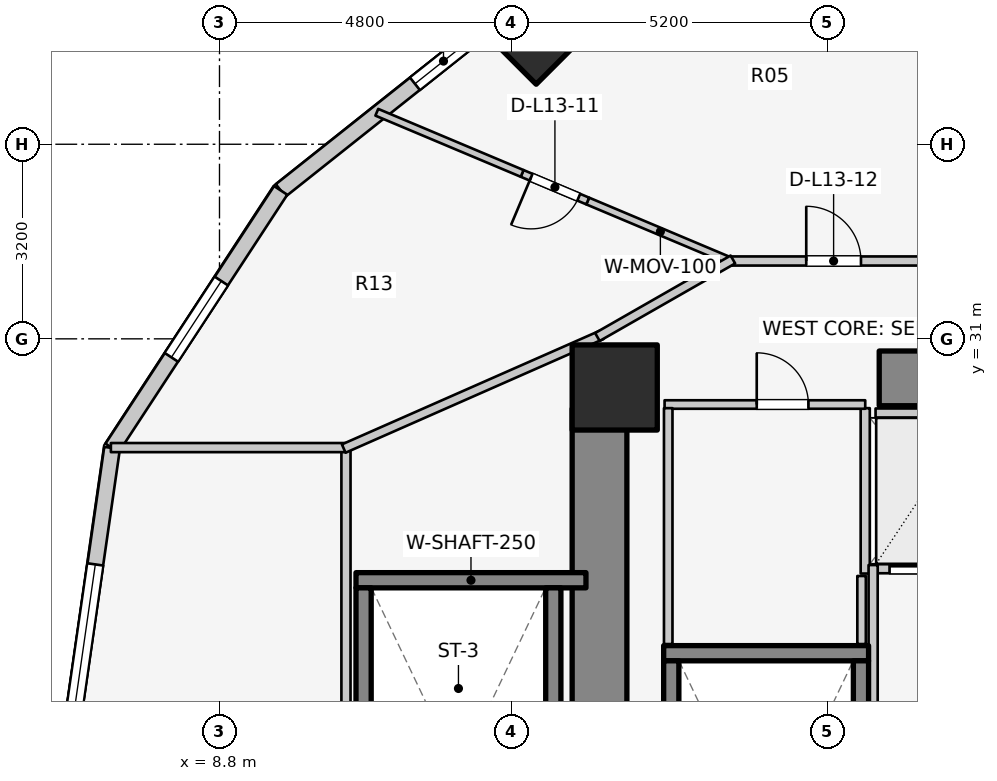
"""IFC4 building model, lengths in metres.
Left out: names, types, materials, properties, quantities, classifications, styles, units other than length and angle.
Written with IfcOpenShell. Run it as: python <this file> out.ifc"""

import sys

from ifc_helpers import new_model, si_unit, direction, frame, frame_2d, origin, origin_2d, place, context, subcontext, project, spatial, rectangle, extrude, element, fill, save


model = new_model("IFC4")
c1 = context("Model", 3, precision=1e-05, world=origin(), true_north=direction((0.0, 1.0)))
c2 = subcontext(c1, "Body", "Model", "MODEL_VIEW")
j1 = project(units=[si_unit("LENGTHUNIT", "METRE"), si_unit("PLANEANGLEUNIT", "RADIAN")], contexts=[c1])
p1 = place(None, origin())
s1 = spatial("IfcSite", under=j1, at=p1, CompositionType="ELEMENT")
p2 = place(p1, origin())
s2 = spatial("IfcBuilding", under=s1, at=p2, CompositionType="ELEMENT")
p3 = place(p2, frame((0.0, 0.0, 46.2)))
s3 = spatial("IfcBuildingStorey", under=s2, at=p3, CompositionType="ELEMENT", Elevation=46.2)
p4 = place(p3, frame((15.05, 17.05, 0.0), z_axis=(0.0, 0.0, 1.0), x_axis=(0.0, 1.0, 0.0)))
e1 = element("IfcWall", 1, at=p4, inside=s3, PredefinedType="SHEAR", context=c2, shape_type="SweptSolid", body=[
    extrude(rectangle(XDim=12.8, YDim=0.9, at=frame_2d((6.4, 0.0))), origin(), (0.0, 0.0, 1.0), 3.1),
])
p5 = place(p3, frame((19.65, 30.35, 0.0), z_axis=(0.0, 0.0, 1.0), x_axis=(1.0, 0.0, 0.0)))
e2 = element("IfcWall", 2, at=p5, inside=s3, PredefinedType="SHEAR", context=c2, shape_type="SweptSolid", body=[
    extrude(rectangle(XDim=4.5, YDim=0.9, at=frame_2d((2.25, 0.0))), origin(), (0.0, 0.0, 1.0), 3.1),
])
p6 = place(p3, frame((16.105, 25.83, 0.0), z_axis=(0.0, 0.0, 1.0), x_axis=(1.0, 0.0, 0.0)))
e3 = element("IfcWall", 3, at=p6, inside=s3, PredefinedType="SOLIDWALL", context=c2, shape_type="SweptSolid", body=[
    extrude(rectangle(XDim=3.37, YDim=0.25, at=frame_2d((1.685, 0.0))), origin(), (0.0, 0.0, 1.0), 3.1),
])
for number, where, z_axis, x_axis in (
    (4, (16.23, 17.895, 0.0), (0.0, 0.0, 1.0), (0.0, 1.0, 0.0)),
    (5, (19.35, 17.895, 0.0), (0.0, 0.0, 1.0), (0.0, 1.0, 0.0)),
):
    element("IfcWall", number, at=place(p3, frame(where, z_axis=z_axis, x_axis=x_axis)), inside=s3, PredefinedType="SOLIDWALL", context=c2, shape_type="SweptSolid", body=[
        extrude(rectangle(XDim=7.81, YDim=0.25, at=frame_2d((3.905, 0.0))), origin(), (0.0, 0.0, 1.0), 3.1),
    ])
p7 = place(p3, frame((11.045, 27.03, 0.0), z_axis=(0.0, 0.0, 1.0), x_axis=(1.0, 0.0, 0.0)))
e6 = element("IfcWall", 6, at=p7, inside=s3, PredefinedType="SOLIDWALL", context=c2, shape_type="SweptSolid", body=[
    extrude(rectangle(XDim=3.782, YDim=0.25, at=frame_2d((1.891, 0.0))), origin(), (0.0, 0.0, 1.0), 3.1),
])
for number, where, z_axis, x_axis in (
    (7, (11.17, 19.095, 0.0), (0.0, 0.0, 1.0), (0.0, 1.0, 0.0)),
    (8, (14.29, 19.095, 0.0), (0.0, 0.0, 1.0), (0.0, 1.0, 0.0)),
):
    element("IfcWall", number, at=place(p3, frame(where, z_axis=z_axis, x_axis=x_axis)), inside=s3, PredefinedType="SOLIDWALL", context=c2, shape_type="SweptSolid", body=[
        extrude(rectangle(XDim=7.81, YDim=0.25, at=frame_2d((3.905, 0.0))), origin(), (0.0, 0.0, 1.0), 3.1),
    ])
p8 = place(p3, frame((15.3, 30.2, 0.0), z_axis=(0.0, 0.0, 1.0), x_axis=(1.0, 0.0, 0.0)))
e9 = element("IfcColumn", 9, at=p8, inside=s3, PredefinedType="COLUMN", context=c2, shape_type="SweptSolid", body=[
    extrude(rectangle(XDim=1.4, YDim=1.4, at=origin_2d()), origin(), (0.0, 0.0, 1.0), 3.1),
])
p9 = place(p3, frame((14.008, 36.035, 0.0), z_axis=(0.0, 0.0, 1.0), x_axis=(-0.707106781187, 0.707106781187, 0.0)))
e10 = element("IfcColumn", 10, at=p9, inside=s3, PredefinedType="COLUMN", context=c2, shape_type="SweptSolid", body=[
    extrude(rectangle(XDim=1.2, YDim=1.2, at=origin_2d()), origin(), (0.0, 0.0, 1.0), 3.1),
])
p10 = place(p3, frame((13.595, 36.45, 0.0), z_axis=(0.0, 0.0, 1.0), x_axis=(-0.783123133379, -0.621866672179, 0.0)))
e11 = element("IfcWall", 11, at=p10, inside=s3, PredefinedType="STANDARD", context=c2, shape_type="SweptSolid", body=[
    extrude(rectangle(XDim=4.839, YDim=0.26, at=frame_2d((2.419, 0.0))), origin(), (0.0, 0.0, 1.0), 2.85),
])
p11 = place(p10, frame((0.819, 0.0, 0.75)))
e12 = element("IfcOpeningElement", 12, at=p11, cuts=e11, PredefinedType="OPENING", context=c2, shape_type="SweptSolid", body=[
    extrude(rectangle(XDim=1.2, YDim=1.5, at=frame_2d((0.6, 0.75))), frame((0.0, 0.14, 0.0), z_axis=(0.0, -1.0, 0.0), x_axis=(1.0, 0.0, 0.0)), (0.0, 0.0, 1.0), 0.28),
])
p12 = place(p3, frame((9.806, 33.441, 0.0), z_axis=(0.0, 0.0, 1.0), x_axis=(-0.547702757047, -0.836672988642, 0.0)))
e13 = element("IfcWall", 13, at=p12, inside=s3, PredefinedType="STANDARD", context=c2, shape_type="SweptSolid", body=[
    extrude(rectangle(XDim=5.062, YDim=0.26, at=frame_2d((2.531, 0.0))), origin(), (0.0, 0.0, 1.0), 2.85),
])
p13 = place(p12, frame((1.781, 0.0, 0.75)))
e14 = element("IfcOpeningElement", 14, at=p13, cuts=e13, PredefinedType="OPENING", context=c2, shape_type="SweptSolid", body=[
    extrude(rectangle(XDim=1.5, YDim=1.6, at=frame_2d((0.75, 0.8))), frame((0.0, 0.14, 0.0), z_axis=(0.0, -1.0, 0.0), x_axis=(1.0, 0.0, 0.0)), (0.0, 0.0, 1.0), 0.28),
])
p14 = place(p3, frame((7.033, 29.205, 0.0), z_axis=(0.0, 0.0, 1.0), x_axis=(-0.142528001686, -0.989790770181, 0.0)))
e15 = element("IfcWall", 15, at=p14, inside=s3, PredefinedType="STANDARD", context=c2, shape_type="SweptSolid", body=[
    extrude(rectangle(XDim=6.269, YDim=0.26, at=frame_2d((3.135, 0.0))), origin(), (0.0, 0.0, 1.0), 2.85),
])
p15 = place(p14, frame((1.935, 0.0, 0.75)))
e16 = element("IfcOpeningElement", 16, at=p15, cuts=e15, PredefinedType="OPENING", context=c2, shape_type="SweptSolid", body=[
    extrude(rectangle(XDim=2.4, YDim=1.7, at=frame_2d((1.2, 0.85))), frame((0.0, 0.14, 0.0), z_axis=(0.0, -1.0, 0.0), x_axis=(1.0, 0.0, 0.0)), (0.0, 0.0, 1.0), 0.28),
])
p16 = place(p3, frame((19.59, 27.22, 0.0), z_axis=(0.0, 0.0, 1.0), x_axis=(1.0, 0.0, 0.0)))
e17 = element("IfcWall", 17, at=p16, inside=s3, PredefinedType="SOLIDWALL", context=c2, shape_type="SweptSolid", body=[
    extrude(rectangle(XDim=1.76, YDim=0.15, at=frame_2d((0.88, 0.0))), origin(), (0.0, 0.0, 1.0), 2.855),
])
p17 = place(p16, frame((0.23, 0.0, 0.0)))
e18 = element("IfcOpeningElement", 18, at=p17, cuts=e17, PredefinedType="OPENING", context=c2, shape_type="SweptSolid", body=[
    extrude(rectangle(XDim=1.3, YDim=2.1, at=frame_2d((0.65, 1.05))), frame((0.0, 0.085, 0.0), z_axis=(0.0, -1.0, 0.0), x_axis=(1.0, 0.0, 0.0)), (0.0, 0.0, 1.0), 0.17),
])
p18 = place(p3, frame((19.59, 29.78, 0.0), z_axis=(0.0, 0.0, 1.0), x_axis=(1.0, 0.0, 0.0)))
e19 = element("IfcWall", 19, at=p18, inside=s3, PredefinedType="SOLIDWALL", context=c2, shape_type="SweptSolid", body=[
    extrude(rectangle(XDim=1.76, YDim=0.15, at=frame_2d((0.88, 0.0))), origin(), (0.0, 0.0, 1.0), 2.855),
])
p19 = place(p3, frame((19.42, 27.14, 0.0), z_axis=(0.0, 0.0, 1.0), x_axis=(0.0, 1.0, 0.0)))
e20 = element("IfcWall", 20, at=p19, inside=s3, PredefinedType="SOLIDWALL", context=c2, shape_type="SweptSolid", body=[
    extrude(rectangle(XDim=2.72, YDim=0.15, at=frame_2d((1.36, 0.0))), origin(), (0.0, 0.0, 1.0), 2.855),
])
p20 = place(p3, frame((19.55, 24.08, 0.0), z_axis=(0.0, 0.0, 1.0), x_axis=(0.0, 1.0, 0.0)))
e21 = element("IfcWall", 21, at=p20, inside=s3, PredefinedType="PARTITIONING", context=c2, shape_type="SweptSolid", body=[
    extrude(rectangle(XDim=3.2, YDim=0.15, at=frame_2d((1.6, 0.0))), origin(), (0.0, 0.0, 1.0), 2.855),
])
p21 = place(p3, frame((16.12, 29.92, 0.0), z_axis=(0.0, 0.0, 1.0), x_axis=(1.0, 0.0, 0.0)))
e22 = element("IfcWall", 22, at=p21, inside=s3, PredefinedType="PLUMBINGWALL", context=c2, shape_type="SweptSolid", body=[
    extrude(rectangle(XDim=3.3, YDim=0.14, at=frame_2d((1.65, 0.0))), origin(), (0.0, 0.0, 1.0), 2.855),
])
p22 = place(p21, frame((1.516, 0.0, 0.0)))
e23 = element("IfcOpeningElement", 23, at=p22, cuts=e22, PredefinedType="OPENING", context=c2, shape_type="SweptSolid", body=[
    extrude(rectangle(XDim=0.85, YDim=2.05, at=frame_2d((0.425, 1.025))), frame((0.0, 0.08, 0.0), z_axis=(0.0, -1.0, 0.0), x_axis=(1.0, 0.0, 0.0)), (0.0, 0.0, 1.0), 0.16),
])
p23 = place(p3, frame((16.18, 25.98, 0.0), z_axis=(0.0, 0.0, 1.0), x_axis=(0.0, 1.0, 0.0)))
e24 = element("IfcWall", 24, at=p23, inside=s3, PredefinedType="PLUMBINGWALL", context=c2, shape_type="SweptSolid", body=[
    extrude(rectangle(XDim=3.88, YDim=0.14, at=frame_2d((1.94, 0.0))), origin(), (0.0, 0.0, 1.0), 2.855),
])
p24 = place(p3, frame((19.36, 25.98, 0.0), z_axis=(0.0, 0.0, 1.0), x_axis=(0.0, 1.0, 0.0)))
e25 = element("IfcWall", 25, at=p24, inside=s3, PredefinedType="PLUMBINGWALL", context=c2, shape_type="SweptSolid", body=[
    extrude(rectangle(XDim=1.12, YDim=0.14, at=frame_2d((0.56, 0.0))), origin(), (0.0, 0.0, 1.0), 2.855),
])
p25 = place(p3, frame((10.88, 16.748, 0.0), z_axis=(0.0, 0.0, 1.0), x_axis=(0.0, 1.0, 0.0)))
e26 = element("IfcWall", 26, at=p25, inside=s3, PredefinedType="PARTITIONING", context=c2, shape_type="SweptSolid", body=[
    extrude(rectangle(XDim=12.503, YDim=0.15, at=frame_2d((6.252, 0.0))), origin(), (0.0, 0.0, 1.0), 2.12),
])
p26 = place(p3, frame((7.014, 29.212, 0.0), z_axis=(0.0, 0.0, 1.0), x_axis=(1.0, 0.0, 0.0)))
e27 = element("IfcWall", 27, at=p26, inside=s3, PredefinedType="PARTITIONING", context=c2, shape_type="SweptSolid", body=[
    extrude(rectangle(XDim=3.866, YDim=0.15, at=frame_2d((1.933, 0.0))), origin(), (0.0, 0.0, 1.0), 2.855),
])
p27 = place(p3, frame((10.844, 29.196, 0.0), z_axis=(0.0, 0.0, 1.0), x_axis=(0.91502756289, 0.403391322604, 0.0)))
e28 = element("IfcWall", 28, at=p27, inside=s3, PredefinedType="PARTITIONING", context=c2, shape_type="SweptSolid", body=[
    extrude(rectangle(XDim=4.637, YDim=0.15, at=frame_2d((2.319, 0.0))), origin(), (0.0, 0.0, 1.0), 2.069),
])
p28 = place(p3, frame((17.246, 32.26, 0.0), z_axis=(0.0, 0.0, 1.0), x_axis=(-0.921672585584, 0.3879686134, 0.0)))
e29 = element("IfcWall", 29, at=p28, inside=s3, PredefinedType="MOVABLE", context=c2, shape_type="SweptSolid", body=[
    extrude(rectangle(XDim=2.593, YDim=0.12, at=frame_2d((1.297, 0.0))), origin(), (0.0, 0.0, 1.0), 2.069),
])
p29 = place(p3, frame((14.856, 33.267, 0.0), z_axis=(0.0, 0.0, 1.0), x_axis=(-0.92176888, 0.387739773384, 0.0)))
e30 = element("IfcWall", 30, at=p29, inside=s3, PredefinedType="MOVABLE", context=c2, shape_type="SweptSolid", body=[
    extrude(rectangle(XDim=1.17, YDim=0.12, at=frame_2d((0.585, 0.0))), origin(), (0.0, 0.0, 1.0), 2.11),
])
p30 = place(p29, frame((0.16, 0.0, 0.0)))
e31 = element("IfcOpeningElement", 31, at=p30, cuts=e30, PredefinedType="OPENING", context=c2, shape_type="SweptSolid", body=[
    extrude(rectangle(XDim=0.85, YDim=2.05, at=frame_2d((0.425, 1.025))), frame((0.0, 0.07, 0.0), z_axis=(0.0, -1.0, 0.0), x_axis=(1.0, 0.0, 0.0)), (0.0, 0.0, 1.0), 0.14),
])
p31 = place(p3, frame((13.778, 33.72, 0.0), z_axis=(0.0, 0.0, 1.0), x_axis=(-0.921706247461, 0.387888635295, 0.0)))
e32 = element("IfcWall", 32, at=p31, inside=s3, PredefinedType="MOVABLE", context=c2, shape_type="SweptSolid", body=[
    extrude(rectangle(XDim=2.593, YDim=0.12, at=frame_2d((1.297, 0.0))), origin(), (0.0, 0.0, 1.0), 2.855),
])
p32 = place(p3, frame((17.15, 32.28, 0.0), z_axis=(0.0, 0.0, 1.0), x_axis=(1.0, 0.0, 0.0)))
e33 = element("IfcWall", 33, at=p32, inside=s3, PredefinedType="PARTITIONING", context=c2, shape_type="SweptSolid", body=[
    extrude(rectangle(XDim=7.52, YDim=0.15, at=frame_2d((3.76, 0.0))), origin(), (0.0, 0.0, 1.0), 2.237),
])
p33 = place(p32, frame((1.3, 0.0, 0.0)))
e34 = element("IfcOpeningElement", 34, at=p33, cuts=e33, PredefinedType="OPENING", context=c2, shape_type="SweptSolid", body=[
    extrude(rectangle(XDim=0.9, YDim=2.1, at=frame_2d((0.45, 1.05))), frame((0.0, 0.085, 0.0), z_axis=(0.0, -1.0, 0.0), x_axis=(1.0, 0.0, 0.0)), (0.0, 0.0, 1.0), 0.17),
])
p34 = place(p3, frame((17.243, 32.305, 0.0), z_axis=(0.0, 0.0, 1.0), x_axis=(-0.867991349648, -0.496579315857, 0.0)))
e35 = element("IfcWall", 35, at=p34, inside=s3, PredefinedType="PARTITIONING", context=c2, shape_type="SweptSolid", body=[
    extrude(rectangle(XDim=2.567, YDim=0.15, at=frame_2d((1.283, 0.0))), origin(), (0.0, 0.0, 1.0), 2.069),
])
p35 = place(p3, frame((26.748, 32.91, 0.0), z_axis=(0.0, 0.0, 1.0), x_axis=(-0.855817136021, 0.517278483694, 0.0)))
e36 = element("IfcWall", 36, at=p35, inside=s3, PredefinedType="PARTITIONING", context=c2, shape_type="SweptSolid", body=[
    extrude(rectangle(XDim=9.564, YDim=0.18, at=frame_2d((4.782, 0.0))), origin(), (0.0, 0.0, 1.0), 2.237),
])
p36 = place(p11, origin())
e37 = element("IfcWindow", 37, at=p36, inside=s3, PartitioningType="SINGLE_PANEL", PredefinedType="WINDOW", context=c2, shape_type="SweptSolid", body=[
    extrude(rectangle(XDim=1.2, YDim=1.5, at=frame_2d((0.6, 0.75))), frame((0.0, 0.03, 0.0), z_axis=(0.0, -1.0, 0.0), x_axis=(1.0, 0.0, 0.0)), (0.0, 0.0, 1.0), 0.06),
])
fill(e12, e37)
p37 = place(p13, origin())
e38 = element("IfcWindow", 38, at=p37, inside=s3, PartitioningType="SINGLE_PANEL", PredefinedType="WINDOW", context=c2, shape_type="SweptSolid", body=[
    extrude(rectangle(XDim=1.5, YDim=1.6, at=frame_2d((0.75, 0.8))), frame((0.0, 0.03, 0.0), z_axis=(0.0, -1.0, 0.0), x_axis=(1.0, 0.0, 0.0)), (0.0, 0.0, 1.0), 0.06),
])
fill(e14, e38)
p38 = place(p15, origin())
e39 = element("IfcWindow", 39, at=p38, inside=s3, PartitioningType="SINGLE_PANEL", PredefinedType="WINDOW", context=c2, shape_type="SweptSolid", body=[
    extrude(rectangle(XDim=2.4, YDim=1.7, at=frame_2d((1.2, 0.85))), frame((0.0, 0.03, 0.0), z_axis=(0.0, -1.0, 0.0), x_axis=(1.0, 0.0, 0.0)), (0.0, 0.0, 1.0), 0.06),
])
fill(e16, e39)
p39 = place(p17, origin())
e40 = element("IfcDoor", 40, at=p39, inside=s3, OperationType="DOUBLE_DOOR_SLIDING", PredefinedType="DOOR", context=c2, shape_type="SweptSolid", body=[
    extrude(rectangle(XDim=1.3, YDim=2.1, at=frame_2d((0.65, 1.05))), frame((0.0, 0.025, 0.0), z_axis=(0.0, -1.0, 0.0), x_axis=(1.0, 0.0, 0.0)), (0.0, 0.0, 1.0), 0.05),
])
fill(e18, e40)
p40 = place(p22, origin())
e41 = element("IfcDoor", 41, at=p40, inside=s3, OperationType="SINGLE_SWING_LEFT", PredefinedType="DOOR", context=c2, shape_type="SweptSolid", body=[
    extrude(rectangle(XDim=0.85, YDim=2.05, at=frame_2d((0.425, 1.025))), frame((0.0, 0.025, 0.0), z_axis=(0.0, -1.0, 0.0), x_axis=(1.0, 0.0, 0.0)), (0.0, 0.0, 1.0), 0.05),
])
fill(e23, e41)
p41 = place(p30, origin())
e42 = element("IfcDoor", 42, at=p41, inside=s3, OperationType="SINGLE_SWING_RIGHT", PredefinedType="DOOR", context=c2, shape_type="SweptSolid", body=[
    extrude(rectangle(XDim=0.85, YDim=2.05, at=frame_2d((0.425, 1.025))), frame((0.0, 0.025, 0.0), z_axis=(0.0, -1.0, 0.0), x_axis=(1.0, 0.0, 0.0)), (0.0, 0.0, 1.0), 0.05),
])
fill(e31, e42)
p42 = place(p33, origin())
e43 = element("IfcDoor", 43, at=p42, inside=s3, OperationType="SINGLE_SWING_LEFT", PredefinedType="DOOR", context=c2, shape_type="SweptSolid", body=[
    extrude(rectangle(XDim=0.9, YDim=2.1, at=frame_2d((0.45, 1.05))), frame((0.0, 0.025, 0.0), z_axis=(0.0, -1.0, 0.0), x_axis=(1.0, 0.0, 0.0)), (0.0, 0.0, 1.0), 0.05),
])
fill(e34, e43)
save(model, sys.argv[1])
